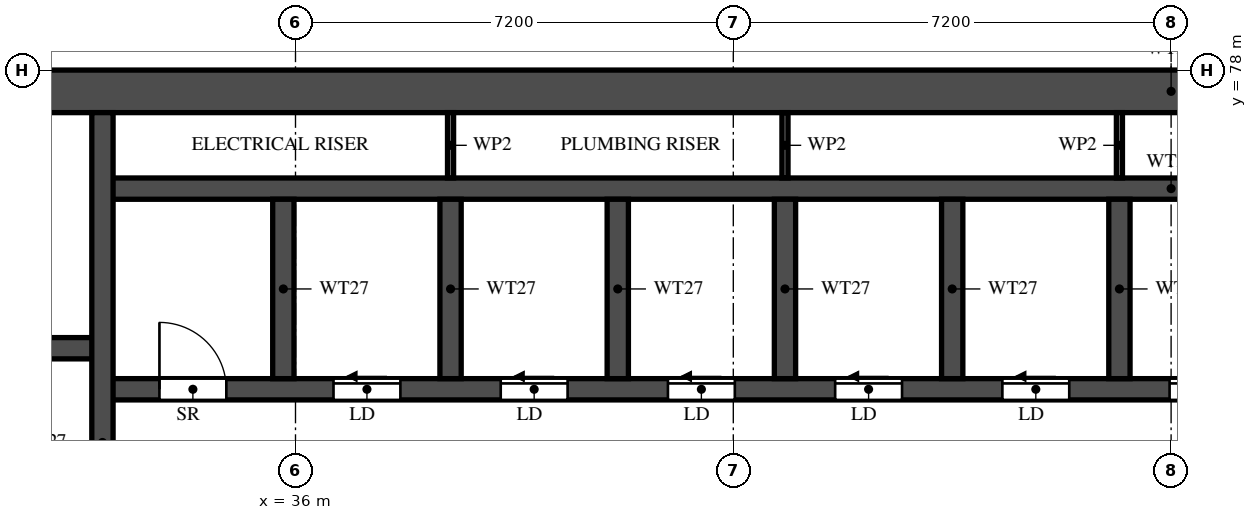
"""IFC4 building model, lengths in metres.
Left out: names, types, materials, properties, quantities, classifications, styles, units other than length and angle.
Written with IfcOpenShell. Run it as: python <this file> out.ifc"""

import sys

from ifc_helpers import new_model, si_unit, direction, frame, frame_2d, origin, place, context, subcontext, project, spatial, rectangle, extrude, element, fill, save


model = new_model("IFC4")
c1 = context("Model", 3, precision=1e-05, world=origin(), true_north=direction((0.0, 1.0)))
c2 = subcontext(c1, "Body", "Model", "MODEL_VIEW")
j1 = project(units=[si_unit("LENGTHUNIT", "METRE"), si_unit("PLANEANGLEUNIT", "RADIAN")], contexts=[c1])
p1 = place(None, origin())
s1 = spatial("IfcSite", under=j1, at=p1, CompositionType="ELEMENT")
p2 = place(p1, origin())
s2 = spatial("IfcBuilding", under=s1, at=p2, CompositionType="ELEMENT")
p3 = place(p2, frame((0.0, 0.0, 153.5)))
s3 = spatial("IfcBuildingStorey", under=s2, at=p3, CompositionType="ELEMENT", Elevation=153.5)
p4 = place(p3, frame((29.7, 77.65, 0.0), z_axis=(0.0, 0.0, 1.0), x_axis=(1.0, 0.0, 0.0)))
e1 = element("IfcWall", 1, at=p4, inside=s3, PredefinedType="SHEAR", context=c2, shape_type="SweptSolid", body=[
    extrude(rectangle(XDim=41.4, YDim=0.7, at=frame_2d((20.7, 0.0))), origin(), (0.0, 0.0, 1.0), 3.2),
])
p5 = place(p3, frame((32.825, 72.75, 0.0), z_axis=(0.0, 0.0, 1.0), x_axis=(1.0, 0.0, 0.0)))
e2 = element("IfcWall", 2, at=p5, inside=s3, PredefinedType="SHEAR", context=c2, shape_type="SweptSolid", body=[
    extrude(rectangle(XDim=35.15, YDim=0.35, at=frame_2d((17.575, 0.0))), origin(), (0.0, 0.0, 1.0), 3.2),
])
p6 = place(p5, frame((19.8, 0.0, 0.0)))
e3 = element("IfcOpeningElement", 3, at=p6, cuts=e2, PredefinedType="OPENING", context=c2, shape_type="SweptSolid", body=[
    extrude(rectangle(XDim=1.1, YDim=2.1, at=frame_2d((0.55, 1.05))), frame((0.0, 0.185, 0.0), z_axis=(0.0, -1.0, 0.0), x_axis=(1.0, 0.0, 0.0)), (0.0, 0.0, 1.0), 0.37),
])
p7 = place(p5, frame((27.7, 0.0, 0.0)))
e4 = element("IfcOpeningElement", 4, at=p7, cuts=e2, PredefinedType="OPENING", context=c2, shape_type="SweptSolid", body=[
    extrude(rectangle(XDim=1.1, YDim=2.1, at=frame_2d((0.55, 1.05))), frame((0.0, 0.185, 0.0), z_axis=(0.0, -1.0, 0.0), x_axis=(1.0, 0.0, 0.0)), (0.0, 0.0, 1.0), 0.37),
])
p8 = place(p5, frame((30.3, 0.0, 0.0)))
e5 = element("IfcOpeningElement", 5, at=p8, cuts=e2, PredefinedType="OPENING", context=c2, shape_type="SweptSolid", body=[
    extrude(rectangle(XDim=1.1, YDim=2.1, at=frame_2d((0.55, 1.05))), frame((0.0, 0.185, 0.0), z_axis=(0.0, -1.0, 0.0), x_axis=(1.0, 0.0, 0.0)), (0.0, 0.0, 1.0), 0.37),
])
p9 = place(p5, frame((3.8, 0.0, 0.0)))
e6 = element("IfcOpeningElement", 6, at=p9, cuts=e2, PredefinedType="OPENING", context=c2, shape_type="SweptSolid", body=[
    extrude(rectangle(XDim=1.1, YDim=2.1, at=frame_2d((0.55, 1.05))), frame((0.0, 0.185, 0.0), z_axis=(0.0, -1.0, 0.0), x_axis=(1.0, 0.0, 0.0)), (0.0, 0.0, 1.0), 0.37),
])
p10 = place(p5, frame((6.55, 0.0, 0.0)))
e7 = element("IfcOpeningElement", 7, at=p10, cuts=e2, PredefinedType="OPENING", context=c2, shape_type="SweptSolid", body=[
    extrude(rectangle(XDim=1.1, YDim=2.1, at=frame_2d((0.55, 1.05))), frame((0.0, 0.185, 0.0), z_axis=(0.0, -1.0, 0.0), x_axis=(1.0, 0.0, 0.0)), (0.0, 0.0, 1.0), 0.37),
])
p11 = place(p5, frame((9.3, 0.0, 0.0)))
e8 = element("IfcOpeningElement", 8, at=p11, cuts=e2, PredefinedType="OPENING", context=c2, shape_type="SweptSolid", body=[
    extrude(rectangle(XDim=1.1, YDim=2.1, at=frame_2d((0.55, 1.05))), frame((0.0, 0.185, 0.0), z_axis=(0.0, -1.0, 0.0), x_axis=(1.0, 0.0, 0.0)), (0.0, 0.0, 1.0), 0.37),
])
p12 = place(p5, frame((12.05, 0.0, 0.0)))
e9 = element("IfcOpeningElement", 9, at=p12, cuts=e2, PredefinedType="OPENING", context=c2, shape_type="SweptSolid", body=[
    extrude(rectangle(XDim=1.1, YDim=2.1, at=frame_2d((0.55, 1.05))), frame((0.0, 0.185, 0.0), z_axis=(0.0, -1.0, 0.0), x_axis=(1.0, 0.0, 0.0)), (0.0, 0.0, 1.0), 0.37),
])
p13 = place(p5, frame((14.8, 0.0, 0.0)))
e10 = element("IfcOpeningElement", 10, at=p13, cuts=e2, PredefinedType="OPENING", context=c2, shape_type="SweptSolid", body=[
    extrude(rectangle(XDim=1.1, YDim=2.1, at=frame_2d((0.55, 1.05))), frame((0.0, 0.185, 0.0), z_axis=(0.0, -1.0, 0.0), x_axis=(1.0, 0.0, 0.0)), (0.0, 0.0, 1.0), 0.37),
])
p14 = place(p5, frame((17.55, 0.0, 0.0)))
e11 = element("IfcOpeningElement", 11, at=p14, cuts=e2, PredefinedType="OPENING", context=c2, shape_type="SweptSolid", body=[
    extrude(rectangle(XDim=1.1, YDim=2.1, at=frame_2d((0.55, 1.05))), frame((0.0, 0.185, 0.0), z_axis=(0.0, -1.0, 0.0), x_axis=(1.0, 0.0, 0.0)), (0.0, 0.0, 1.0), 0.37),
])
p15 = place(p5, frame((0.938, 0.0, 0.0)))
e12 = element("IfcOpeningElement", 12, at=p15, cuts=e2, PredefinedType="OPENING", context=c2, shape_type="SweptSolid", body=[
    extrude(rectangle(XDim=1.1, YDim=2.1, at=frame_2d((0.55, 1.05))), frame((0.0, 0.185, 0.0), z_axis=(0.0, -1.0, 0.0), x_axis=(1.0, 0.0, 0.0)), (0.0, 0.0, 1.0), 0.37),
])
p16 = place(p3, frame((32.825, 76.05, 0.0), z_axis=(0.0, 0.0, 1.0), x_axis=(1.0, 0.0, 0.0)))
e13 = element("IfcWall", 13, at=p16, inside=s3, PredefinedType="SHEAR", context=c2, shape_type="SweptSolid", body=[
    extrude(rectangle(XDim=35.15, YDim=0.35, at=frame_2d((17.575, 0.0))), origin(), (0.0, 0.0, 1.0), 3.2),
])
p17 = place(p3, frame((29.7, 73.425, 0.0), z_axis=(0.0, 0.0, 1.0), x_axis=(1.0, 0.0, 0.0)))
e14 = element("IfcWall", 14, at=p17, inside=s3, PredefinedType="SHEAR", context=c2, shape_type="SweptSolid", body=[
    extrude(rectangle(XDim=3.125, YDim=0.35, at=frame_2d((1.562, 0.0))), origin(), (0.0, 0.0, 1.0), 3.2),
])
p18 = place(p3, frame((32.825, 66.45, 0.0), z_axis=(0.0, 0.0, 1.0), x_axis=(0.0, 1.0, 0.0)))
e15 = element("IfcWall", 15, at=p18, inside=s3, PredefinedType="SHEAR", context=c2, shape_type="SweptSolid", body=[
    extrude(rectangle(XDim=10.85, YDim=0.35, at=frame_2d((5.425, 0.0))), origin(), (0.0, 0.0, 1.0), 3.2),
])
for number, where, z_axis, x_axis in (
    (16, (35.8, 72.925, 0.0), (0.0, 0.0, 1.0), (0.0, 1.0, 0.0)),
    (17, (38.55, 72.925, 0.0), (0.0, 0.0, 1.0), (0.0, 1.0, 0.0)),
    (18, (41.3, 72.925, 0.0), (0.0, 0.0, 1.0), (0.0, 1.0, 0.0)),
    (19, (44.05, 72.925, 0.0), (0.0, 0.0, 1.0), (0.0, 1.0, 0.0)),
    (20, (46.8, 72.925, 0.0), (0.0, 0.0, 1.0), (0.0, 1.0, 0.0)),
    (21, (49.55, 72.925, 0.0), (0.0, 0.0, 1.0), (0.0, 1.0, 0.0)),
):
    element("IfcWall", number, at=place(p3, frame(where, z_axis=z_axis, x_axis=x_axis)), inside=s3, PredefinedType="SHEAR", context=c2, shape_type="SweptSolid", body=[
        extrude(rectangle(XDim=2.95, YDim=0.35, at=frame_2d((1.475, 0.0))), origin(), (0.0, 0.0, 1.0), 3.2),
    ])
for number, where, z_axis, x_axis in (
    (22, (38.55, 76.225, 0.0), (0.0, 0.0, 1.0), (0.0, 1.0, 0.0)),
    (23, (44.05, 76.225, 0.0), (0.0, 0.0, 1.0), (0.0, 1.0, 0.0)),
    (24, (49.55, 76.225, 0.0), (0.0, 0.0, 1.0), (0.0, 1.0, 0.0)),
):
    element("IfcWall", number, at=place(p3, frame(where, z_axis=z_axis, x_axis=x_axis)), inside=s3, PredefinedType="PARTITIONING", context=c2, shape_type="SweptSolid", body=[
        extrude(rectangle(XDim=1.075, YDim=0.1, at=frame_2d((0.538, 0.0))), origin(), (0.0, 0.0, 1.0), 3.2),
    ])
p19 = place(p9, origin())
e25 = element("IfcDoor", 25, at=p19, inside=s3, OperationType="SLIDING_TO_LEFT", PredefinedType="DOOR", context=c2, shape_type="SweptSolid", body=[
    extrude(rectangle(XDim=1.1, YDim=2.1, at=frame_2d((0.55, 1.05))), frame((0.0, 0.025, 0.0), z_axis=(0.0, -1.0, 0.0), x_axis=(1.0, 0.0, 0.0)), (0.0, 0.0, 1.0), 0.05),
])
fill(e6, e25)
p20 = place(p10, origin())
e26 = element("IfcDoor", 26, at=p20, inside=s3, OperationType="SLIDING_TO_LEFT", PredefinedType="DOOR", context=c2, shape_type="SweptSolid", body=[
    extrude(rectangle(XDim=1.1, YDim=2.1, at=frame_2d((0.55, 1.05))), frame((0.0, 0.025, 0.0), z_axis=(0.0, -1.0, 0.0), x_axis=(1.0, 0.0, 0.0)), (0.0, 0.0, 1.0), 0.05),
])
fill(e7, e26)
p21 = place(p11, origin())
e27 = element("IfcDoor", 27, at=p21, inside=s3, OperationType="SLIDING_TO_LEFT", PredefinedType="DOOR", context=c2, shape_type="SweptSolid", body=[
    extrude(rectangle(XDim=1.1, YDim=2.1, at=frame_2d((0.55, 1.05))), frame((0.0, 0.025, 0.0), z_axis=(0.0, -1.0, 0.0), x_axis=(1.0, 0.0, 0.0)), (0.0, 0.0, 1.0), 0.05),
])
fill(e8, e27)
p22 = place(p12, origin())
e28 = element("IfcDoor", 28, at=p22, inside=s3, OperationType="SLIDING_TO_LEFT", PredefinedType="DOOR", context=c2, shape_type="SweptSolid", body=[
    extrude(rectangle(XDim=1.1, YDim=2.1, at=frame_2d((0.55, 1.05))), frame((0.0, 0.025, 0.0), z_axis=(0.0, -1.0, 0.0), x_axis=(1.0, 0.0, 0.0)), (0.0, 0.0, 1.0), 0.05),
])
fill(e9, e28)
p23 = place(p13, origin())
e29 = element("IfcDoor", 29, at=p23, inside=s3, OperationType="SLIDING_TO_LEFT", PredefinedType="DOOR", context=c2, shape_type="SweptSolid", body=[
    extrude(rectangle(XDim=1.1, YDim=2.1, at=frame_2d((0.55, 1.05))), frame((0.0, 0.025, 0.0), z_axis=(0.0, -1.0, 0.0), x_axis=(1.0, 0.0, 0.0)), (0.0, 0.0, 1.0), 0.05),
])
fill(e10, e29)
p24 = place(p14, origin())
e30 = element("IfcDoor", 30, at=p24, inside=s3, OperationType="SLIDING_TO_LEFT", PredefinedType="DOOR", context=c2, shape_type="SweptSolid", body=[
    extrude(rectangle(XDim=1.1, YDim=2.1, at=frame_2d((0.55, 1.05))), frame((0.0, 0.025, 0.0), z_axis=(0.0, -1.0, 0.0), x_axis=(1.0, 0.0, 0.0)), (0.0, 0.0, 1.0), 0.05),
])
fill(e11, e30)
p25 = place(p15, origin())
e31 = element("IfcDoor", 31, at=p25, inside=s3, OperationType="SINGLE_SWING_LEFT", PredefinedType="DOOR", context=c2, shape_type="SweptSolid", body=[
    extrude(rectangle(XDim=1.1, YDim=2.1, at=frame_2d((0.55, 1.05))), frame((0.0, 0.025, 0.0), z_axis=(0.0, -1.0, 0.0), x_axis=(1.0, 0.0, 0.0)), (0.0, 0.0, 1.0), 0.05),
])
fill(e12, e31)
save(model, sys.argv[1])
